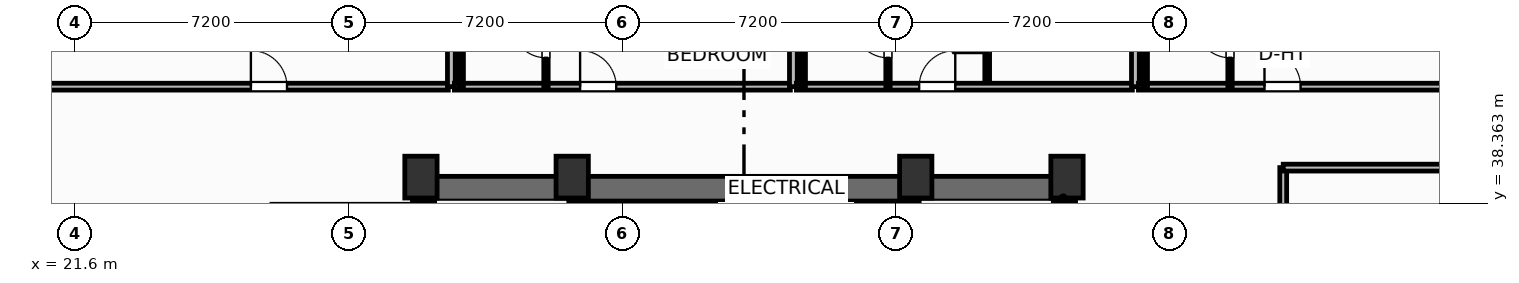
"""IFC4 building model, lengths in metres.
Left out: names, types, materials, properties, quantities, classifications, styles, units other than length and angle.
Written with IfcOpenShell. Run it as: python <this file> out.ifc"""

import sys

from ifc_helpers import new_model, si_unit, direction, frame, frame_2d, origin, origin_2d, place, context, subcontext, project, spatial, rectangle, extrude, element, fill, save


model = new_model("IFC4")
c1 = context("Model", 3, precision=1e-05, world=origin(), true_north=direction((0.0, 1.0)))
c2 = subcontext(c1, "Body", "Model", "MODEL_VIEW")
j1 = project(units=[si_unit("LENGTHUNIT", "METRE"), si_unit("PLANEANGLEUNIT", "RADIAN")], contexts=[c1])
p1 = place(None, origin())
s1 = spatial("IfcSite", under=j1, at=p1, CompositionType="ELEMENT")
p2 = place(p1, origin())
s2 = spatial("IfcBuilding", under=s1, at=p2, CompositionType="ELEMENT")
p3 = place(p2, frame((0.0, 0.0, 185.7)))
s3 = spatial("IfcBuildingStorey", under=s2, at=p3, CompositionType="ELEMENT", Elevation=185.7)
for number, where, z_axis, x_axis in (
    (1, (30.7, 39.05, 0.0), (0.0, 0.0, 1.0), (1.0, 0.0, 0.0)),
    (2, (34.68, 39.05, 0.0), (0.0, 0.0, 1.0), (1.0, 0.0, 0.0)),
    (3, (43.72, 39.05, 0.0), (0.0, 0.0, 1.0), (1.0, 0.0, 0.0)),
    (4, (47.7, 39.05, 0.0), (0.0, 0.0, 1.0), (1.0, 0.0, 0.0)),
):
    element("IfcColumn", number, at=place(p3, frame(where, z_axis=z_axis, x_axis=x_axis)), inside=s3, PredefinedType="COLUMN", context=c2, shape_type="SweptSolid", body=[
        extrude(rectangle(XDim=0.85, YDim=1.1, at=origin_2d()), origin(), (0.0, 0.0, 1.0), 3.7),
    ])
p4 = place(p3, frame((30.48, 38.745, 0.0), z_axis=(0.0, 0.0, 1.0), x_axis=(1.0, 0.0, 0.0)))
e5 = element("IfcWall", 5, at=p4, inside=s3, PredefinedType="SHEAR", context=c2, shape_type="SweptSolid", body=[
    extrude(rectangle(XDim=17.44, YDim=0.65, at=frame_2d((8.72, 0.0))), origin(), (0.0, 0.0, 1.0), 3.45),
])
for number, where, z_axis, x_axis in (
    (6, (30.805, 29.2, 0.0), (0.0, 0.0, 1.0), (0.0, 1.0, 0.0)),
    (7, (47.595, 29.2, 0.0), (0.0, 0.0, 1.0), (0.0, 1.0, 0.0)),
):
    element("IfcWall", number, at=place(p3, frame(where, z_axis=z_axis, x_axis=x_axis)), inside=s3, PredefinedType="SHEAR", context=c2, shape_type="SweptSolid", body=[
        extrude(rectangle(XDim=9.22, YDim=0.65, at=frame_2d((4.61, 0.0))), origin(), (0.0, 0.0, 1.0), 3.45),
    ])
p5 = place(p3, frame((34.64, 29.2, 0.0), z_axis=(0.0, 0.0, 1.0), x_axis=(0.0, 1.0, 0.0)))
e8 = element("IfcWall", 8, at=p5, inside=s3, PredefinedType="SHEAR", context=c2, shape_type="SweptSolid", body=[
    extrude(rectangle(XDim=9.22, YDim=0.25, at=frame_2d((4.61, 0.0))), origin(), (0.0, 0.0, 1.0), 3.45),
])
p6 = place(p5, frame((0.65, 0.0, 0.0)))
e9 = element("IfcOpeningElement", 9, at=p6, cuts=e8, PredefinedType="OPENING", context=c2, shape_type="SweptSolid", body=[
    extrude(rectangle(XDim=1.05, YDim=2.15, at=frame_2d((0.525, 1.075))), frame((0.0, 0.135, 0.0), z_axis=(0.0, -1.0, 0.0), x_axis=(1.0, 0.0, 0.0)), (0.0, 0.0, 1.0), 0.27),
])
p7 = place(p3, frame((43.76, 29.2, 0.0), z_axis=(0.0, 0.0, 1.0), x_axis=(0.0, 1.0, 0.0)))
e10 = element("IfcWall", 10, at=p7, inside=s3, PredefinedType="SHEAR", context=c2, shape_type="SweptSolid", body=[
    extrude(rectangle(XDim=9.22, YDim=0.25, at=frame_2d((4.61, 0.0))), origin(), (0.0, 0.0, 1.0), 3.45),
])
p8 = place(p7, frame((0.65, 0.0, 0.0)))
e11 = element("IfcOpeningElement", 11, at=p8, cuts=e10, PredefinedType="OPENING", context=c2, shape_type="SweptSolid", body=[
    extrude(rectangle(XDim=1.05, YDim=2.15, at=frame_2d((0.525, 1.075))), frame((0.0, 0.135, 0.0), z_axis=(0.0, -1.0, 0.0), x_axis=(1.0, 0.0, 0.0)), (0.0, 0.0, 1.0), 0.27),
])
p9 = place(p3, frame((3.393, 41.43, 0.0), z_axis=(0.0, 0.0, 1.0), x_axis=(1.0, 0.0, 0.0)))
e12 = element("IfcWall", 12, at=p9, inside=s3, PredefinedType="PARTITIONING", context=c2, shape_type="SweptSolid", body=[
    extrude(rectangle(XDim=28.027, YDim=0.18, at=frame_2d((14.013, 0.0))), origin(), (0.0, 0.0, 1.0), 2.662),
])
p10 = place(p9, frame((22.832, 0.0, 0.0)))
e13 = element("IfcOpeningElement", 13, at=p10, cuts=e12, PredefinedType="OPENING", context=c2, shape_type="SweptSolid", body=[
    extrude(rectangle(XDim=0.95, YDim=2.05, at=frame_2d((0.475, 1.025))), frame((0.0, 0.1, 0.0), z_axis=(0.0, -1.0, 0.0), x_axis=(1.0, 0.0, 0.0)), (0.0, 0.0, 1.0), 0.2),
])
p11 = place(p3, frame((31.5, 41.43, 0.0), z_axis=(0.0, 0.0, 1.0), x_axis=(0.0, 1.0, 0.0)))
e14 = element("IfcWall", 14, at=p11, inside=s3, PredefinedType="PARTITIONING", context=c2, shape_type="SweptSolid", body=[
    extrude(rectangle(XDim=4.856, YDim=0.205, at=frame_2d((2.428, 0.0))), origin(), (0.0, 0.0, 1.0), 3.45),
])
p12 = place(p3, frame((31.58, 41.43, 0.0), z_axis=(0.0, 0.0, 1.0), x_axis=(1.0, 0.0, 0.0)))
e15 = element("IfcWall", 15, at=p12, inside=s3, PredefinedType="PARTITIONING", context=c2, shape_type="SweptSolid", body=[
    extrude(rectangle(XDim=8.84, YDim=0.18, at=frame_2d((4.42, 0.0))), origin(), (0.0, 0.0, 1.0), 3.45),
])
p13 = place(p12, frame((3.308, 0.0, 0.0)))
e16 = element("IfcOpeningElement", 16, at=p13, cuts=e15, PredefinedType="OPENING", context=c2, shape_type="SweptSolid", body=[
    extrude(rectangle(XDim=0.95, YDim=2.15, at=frame_2d((0.475, 1.075))), frame((0.0, 0.1, 0.0), z_axis=(0.0, -1.0, 0.0), x_axis=(1.0, 0.0, 0.0)), (0.0, 0.0, 1.0), 0.2),
])
p14 = place(p3, frame((33.99, 41.43, 0.0), z_axis=(0.0, 0.0, 1.0), x_axis=(0.0, 1.0, 0.0)))
e17 = element("IfcWall", 17, at=p14, inside=s3, PredefinedType="PARTITIONING", context=c2, shape_type="SweptSolid", body=[
    extrude(rectangle(XDim=2.52, YDim=0.115, at=frame_2d((1.26, 0.0))), origin(), (0.0, 0.0, 1.0), 3.45),
])
p15 = place(p14, frame((0.76, 0.0, 0.0)))
e18 = element("IfcOpeningElement", 18, at=p15, cuts=e17, PredefinedType="OPENING", context=c2, shape_type="SweptSolid", body=[
    extrude(rectangle(XDim=0.9, YDim=2.05, at=frame_2d((0.45, 1.025))), frame((0.0, 0.067, 0.0), z_axis=(0.0, -1.0, 0.0), x_axis=(1.0, 0.0, 0.0)), (0.0, 0.0, 1.0), 0.135),
])
p16 = place(p3, frame((31.76, 41.43, 0.0), z_axis=(0.0, 0.0, 1.0), x_axis=(0.0, 1.0, 0.0)))
e19 = element("IfcWall", 19, at=p16, inside=s3, PredefinedType="PARTITIONING", context=c2, shape_type="SweptSolid", body=[
    extrude(rectangle(XDim=2.52, YDim=0.115, at=frame_2d((1.26, 0.0))), origin(), (0.0, 0.0, 1.0), 3.45),
])
p17 = place(p3, frame((40.5, 41.43, 0.0), z_axis=(0.0, 0.0, 1.0), x_axis=(0.0, 1.0, 0.0)))
e20 = element("IfcWall", 20, at=p17, inside=s3, PredefinedType="PARTITIONING", context=c2, shape_type="SweptSolid", body=[
    extrude(rectangle(XDim=5.947, YDim=0.205, at=frame_2d((2.974, 0.0))), origin(), (0.0, 0.0, 1.0), 3.45),
])
p18 = place(p3, frame((45.6, 41.43, 0.0), z_axis=(0.0, 0.0, 1.0), x_axis=(0.0, 1.0, 0.0)))
e21 = element("IfcWall", 21, at=p18, inside=s3, PredefinedType="PARTITIONING", context=c2, shape_type="SweptSolid", body=[
    extrude(rectangle(XDim=6.565, YDim=0.125, at=frame_2d((3.283, 0.0))), origin(), (0.0, 0.0, 1.0), 3.45),
])
p19 = place(p18, frame((0.885, 0.0, 0.0)))
e22 = element("IfcOpeningElement", 22, at=p19, cuts=e21, PredefinedType="OPENING", context=c2, shape_type="SweptSolid", body=[
    extrude(rectangle(XDim=0.92, YDim=2.05, at=frame_2d((0.46, 1.025))), frame((0.0, 0.073, 0.0), z_axis=(0.0, -1.0, 0.0), x_axis=(1.0, 0.0, 0.0)), (0.0, 0.0, 1.0), 0.145),
])
p20 = place(p3, frame((40.58, 41.43, 0.0), z_axis=(0.0, 0.0, 1.0), x_axis=(1.0, 0.0, 0.0)))
e23 = element("IfcWall", 23, at=p20, inside=s3, PredefinedType="PARTITIONING", context=c2, shape_type="SweptSolid", body=[
    extrude(rectangle(XDim=8.84, YDim=0.18, at=frame_2d((4.42, 0.0))), origin(), (0.0, 0.0, 1.0), 3.45),
])
p21 = place(p20, frame((3.23, 0.0, 0.0)))
e24 = element("IfcOpeningElement", 24, at=p21, cuts=e23, PredefinedType="OPENING", context=c2, shape_type="SweptSolid", body=[
    extrude(rectangle(XDim=0.95, YDim=2.15, at=frame_2d((0.475, 1.075))), frame((0.0, 0.1, 0.0), z_axis=(0.0, -1.0, 0.0), x_axis=(1.0, 0.0, 0.0)), (0.0, 0.0, 1.0), 0.2),
])
p22 = place(p3, frame((42.99, 41.43, 0.0), z_axis=(0.0, 0.0, 1.0), x_axis=(0.0, 1.0, 0.0)))
e25 = element("IfcWall", 25, at=p22, inside=s3, PredefinedType="PARTITIONING", context=c2, shape_type="SweptSolid", body=[
    extrude(rectangle(XDim=2.52, YDim=0.115, at=frame_2d((1.26, 0.0))), origin(), (0.0, 0.0, 1.0), 3.45),
])
p23 = place(p22, frame((0.76, 0.0, 0.0)))
e26 = element("IfcOpeningElement", 26, at=p23, cuts=e25, PredefinedType="OPENING", context=c2, shape_type="SweptSolid", body=[
    extrude(rectangle(XDim=0.9, YDim=2.05, at=frame_2d((0.45, 1.025))), frame((0.0, 0.067, 0.0), z_axis=(0.0, -1.0, 0.0), x_axis=(1.0, 0.0, 0.0)), (0.0, 0.0, 1.0), 0.135),
])
p24 = place(p3, frame((40.76, 41.43, 0.0), z_axis=(0.0, 0.0, 1.0), x_axis=(0.0, 1.0, 0.0)))
e27 = element("IfcWall", 27, at=p24, inside=s3, PredefinedType="PARTITIONING", context=c2, shape_type="SweptSolid", body=[
    extrude(rectangle(XDim=2.52, YDim=0.115, at=frame_2d((1.26, 0.0))), origin(), (0.0, 0.0, 1.0), 3.45),
])
p25 = place(p3, frame((49.5, 41.43, 0.0), z_axis=(0.0, 0.0, 1.0), x_axis=(0.0, 1.0, 0.0)))
e28 = element("IfcWall", 28, at=p25, inside=s3, PredefinedType="PARTITIONING", context=c2, shape_type="SweptSolid", body=[
    extrude(rectangle(XDim=4.923, YDim=0.205, at=frame_2d((2.461, 0.0))), origin(), (0.0, 0.0, 1.0), 3.45),
])
p26 = place(p3, frame((49.58, 41.43, 0.0), z_axis=(0.0, 0.0, 1.0), x_axis=(1.0, 0.0, 0.0)))
e29 = element("IfcWall", 29, at=p26, inside=s3, PredefinedType="PARTITIONING", context=c2, shape_type="SweptSolid", body=[
    extrude(rectangle(XDim=23.042, YDim=0.18, at=frame_2d((11.521, 0.0))), origin(), (0.0, 0.0, 1.0), 3.45),
])
p27 = place(p26, frame((3.317, 0.0, 0.0)))
e30 = element("IfcOpeningElement", 30, at=p27, cuts=e29, PredefinedType="OPENING", context=c2, shape_type="SweptSolid", body=[
    extrude(rectangle(XDim=0.95, YDim=2.15, at=frame_2d((0.475, 1.075))), frame((0.0, 0.1, 0.0), z_axis=(0.0, -1.0, 0.0), x_axis=(1.0, 0.0, 0.0)), (0.0, 0.0, 1.0), 0.2),
])
p28 = place(p3, frame((51.99, 41.43, 0.0), z_axis=(0.0, 0.0, 1.0), x_axis=(0.0, 1.0, 0.0)))
e31 = element("IfcWall", 31, at=p28, inside=s3, PredefinedType="PARTITIONING", context=c2, shape_type="SweptSolid", body=[
    extrude(rectangle(XDim=2.52, YDim=0.115, at=frame_2d((1.26, 0.0))), origin(), (0.0, 0.0, 1.0), 3.45),
])
p29 = place(p28, frame((0.76, 0.0, 0.0)))
e32 = element("IfcOpeningElement", 32, at=p29, cuts=e31, PredefinedType="OPENING", context=c2, shape_type="SweptSolid", body=[
    extrude(rectangle(XDim=0.9, YDim=2.05, at=frame_2d((0.45, 1.025))), frame((0.0, 0.067, 0.0), z_axis=(0.0, -1.0, 0.0), x_axis=(1.0, 0.0, 0.0)), (0.0, 0.0, 1.0), 0.135),
])
p30 = place(p3, frame((49.76, 41.43, 0.0), z_axis=(0.0, 0.0, 1.0), x_axis=(0.0, 1.0, 0.0)))
e33 = element("IfcWall", 33, at=p30, inside=s3, PredefinedType="PARTITIONING", context=c2, shape_type="SweptSolid", body=[
    extrude(rectangle(XDim=2.52, YDim=0.115, at=frame_2d((1.26, 0.0))), origin(), (0.0, 0.0, 1.0), 3.45),
])
p31 = place(p3, frame((53.39, 19.28, 0.0), z_axis=(0.0, 0.0, 1.0), x_axis=(0.0, 1.0, 0.0)))
e34 = element("IfcWall", 34, at=p31, inside=s3, PredefinedType="PARTITIONING", context=c2, shape_type="SweptSolid", body=[
    extrude(rectangle(XDim=20.02, YDim=0.18, at=frame_2d((10.01, 0.0))), origin(), (0.0, 0.0, 1.0), 3.45),
])
p32 = place(p31, frame((8.07, 0.0, 0.0)))
e35 = element("IfcOpeningElement", 35, at=p32, cuts=e34, PredefinedType="OPENING", context=c2, shape_type="SweptSolid", body=[
    extrude(rectangle(XDim=0.92, YDim=2.05, at=frame_2d((0.46, 1.025))), frame((0.0, 0.1, 0.0), z_axis=(0.0, -1.0, 0.0), x_axis=(1.0, 0.0, 0.0)), (0.0, 0.0, 1.0), 0.2),
])
p33 = place(p3, frame((53.39, 39.3, 0.0), z_axis=(0.0, 0.0, 1.0), x_axis=(1.0, 0.0, 0.0)))
e36 = element("IfcWall", 36, at=p33, inside=s3, PredefinedType="PARTITIONING", context=c2, shape_type="SweptSolid", body=[
    extrude(rectangle(XDim=19.49, YDim=0.18, at=frame_2d((9.745, 0.0))), origin(), (0.0, 0.0, 1.0), 3.45),
])
p34 = place(p10, origin())
e37 = element("IfcDoor", 37, at=p34, inside=s3, OperationType="SINGLE_SWING_LEFT", PredefinedType="DOOR", context=c2, shape_type="SweptSolid", body=[
    extrude(rectangle(XDim=0.95, YDim=2.05, at=frame_2d((0.475, 1.025))), frame((0.0, 0.025, 0.0), z_axis=(0.0, -1.0, 0.0), x_axis=(1.0, 0.0, 0.0)), (0.0, 0.0, 1.0), 0.05),
])
fill(e13, e37)
p35 = place(p13, origin())
e38 = element("IfcDoor", 38, at=p35, inside=s3, OperationType="SINGLE_SWING_LEFT", PredefinedType="DOOR", context=c2, shape_type="SweptSolid", body=[
    extrude(rectangle(XDim=0.95, YDim=2.15, at=frame_2d((0.475, 1.075))), frame((0.0, 0.025, 0.0), z_axis=(0.0, -1.0, 0.0), x_axis=(1.0, 0.0, 0.0)), (0.0, 0.0, 1.0), 0.05),
])
fill(e16, e38)
p36 = place(p15, origin())
e39 = element("IfcDoor", 39, at=p36, inside=s3, OperationType="SINGLE_SWING_RIGHT", PredefinedType="DOOR", context=c2, shape_type="SweptSolid", body=[
    extrude(rectangle(XDim=0.9, YDim=2.05, at=frame_2d((0.45, 1.025))), frame((0.0, 0.025, 0.0), z_axis=(0.0, -1.0, 0.0), x_axis=(1.0, 0.0, 0.0)), (0.0, 0.0, 1.0), 0.05),
])
fill(e18, e39)
p37 = place(p19, origin())
e40 = element("IfcDoor", 40, at=p37, inside=s3, OperationType="SINGLE_SWING_LEFT", PredefinedType="DOOR", context=c2, shape_type="SweptSolid", body=[
    extrude(rectangle(XDim=0.92, YDim=2.05, at=frame_2d((0.46, 1.025))), frame((0.0, 0.025, 0.0), z_axis=(0.0, -1.0, 0.0), x_axis=(1.0, 0.0, 0.0)), (0.0, 0.0, 1.0), 0.05),
])
fill(e22, e40)
p38 = place(p21, origin())
e41 = element("IfcDoor", 41, at=p38, inside=s3, OperationType="SINGLE_SWING_RIGHT", PredefinedType="DOOR", context=c2, shape_type="SweptSolid", body=[
    extrude(rectangle(XDim=0.95, YDim=2.15, at=frame_2d((0.475, 1.075))), frame((0.0, 0.025, 0.0), z_axis=(0.0, -1.0, 0.0), x_axis=(1.0, 0.0, 0.0)), (0.0, 0.0, 1.0), 0.05),
])
fill(e24, e41)
p39 = place(p23, origin())
e42 = element("IfcDoor", 42, at=p39, inside=s3, OperationType="SINGLE_SWING_RIGHT", PredefinedType="DOOR", context=c2, shape_type="SweptSolid", body=[
    extrude(rectangle(XDim=0.9, YDim=2.05, at=frame_2d((0.45, 1.025))), frame((0.0, 0.025, 0.0), z_axis=(0.0, -1.0, 0.0), x_axis=(1.0, 0.0, 0.0)), (0.0, 0.0, 1.0), 0.05),
])
fill(e26, e42)
p40 = place(p27, origin())
e43 = element("IfcDoor", 43, at=p40, inside=s3, OperationType="SINGLE_SWING_LEFT", PredefinedType="DOOR", context=c2, shape_type="SweptSolid", body=[
    extrude(rectangle(XDim=0.95, YDim=2.15, at=frame_2d((0.475, 1.075))), frame((0.0, 0.025, 0.0), z_axis=(0.0, -1.0, 0.0), x_axis=(1.0, 0.0, 0.0)), (0.0, 0.0, 1.0), 0.05),
])
fill(e30, e43)
p41 = place(p29, origin())
e44 = element("IfcDoor", 44, at=p41, inside=s3, OperationType="SINGLE_SWING_RIGHT", PredefinedType="DOOR", context=c2, shape_type="SweptSolid", body=[
    extrude(rectangle(XDim=0.9, YDim=2.05, at=frame_2d((0.45, 1.025))), frame((0.0, 0.025, 0.0), z_axis=(0.0, -1.0, 0.0), x_axis=(1.0, 0.0, 0.0)), (0.0, 0.0, 1.0), 0.05),
])
fill(e32, e44)
save(model, sys.argv[1])
